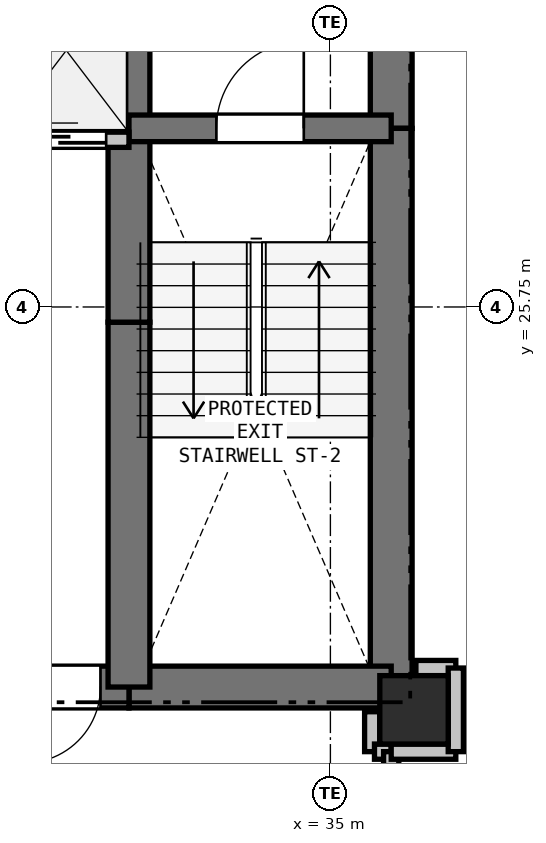
"""IFC4 building model, lengths in metres.
Left out: names, types, materials, properties, quantities, classifications, styles, units other than length and angle.
Written with IfcOpenShell. Run it as: python <this file> out.ifc"""

import sys

from ifc_helpers import new_model, si_unit, direction, frame, frame_2d, origin, origin_2d, place, context, subcontext, project, spatial, rectangle, extrude, element, fill, save


model = new_model("IFC4")
c1 = context("Model", 3, precision=1e-05, world=origin(), true_north=direction((0.0, 1.0)))
c2 = subcontext(c1, "Body", "Model", "MODEL_VIEW")
j1 = project(units=[si_unit("LENGTHUNIT", "METRE"), si_unit("PLANEANGLEUNIT", "RADIAN")], contexts=[c1])
p1 = place(None, origin())
s1 = spatial("IfcSite", under=j1, at=p1, CompositionType="ELEMENT")
p2 = place(p1, origin())
s2 = spatial("IfcBuilding", under=s1, at=p2, CompositionType="ELEMENT")
p3 = place(p2, frame((0.0, 0.0, 25.8)))
s3 = spatial("IfcBuildingStorey", under=s2, at=p3, CompositionType="ELEMENT", Elevation=25.8)
p4 = place(p3, frame((36.1, 20.45, 0.0), z_axis=(0.0, 0.0, 1.0), x_axis=(1.0, 0.0, 0.0)))
e1 = element("IfcColumn", 1, at=p4, inside=s3, PredefinedType="COLUMN", context=c2, shape_type="SweptSolid", body=[
    extrude(rectangle(XDim=0.9, YDim=0.9, at=origin_2d()), origin(), (0.0, 0.0, 1.0), 3.3),
])
p5 = place(p3, frame((35.8, 32.75, 0.0), z_axis=(0.0, 0.0, 1.0), x_axis=(0.0, -1.0, 0.0)))
e2 = element("IfcWall", 2, at=p5, inside=s3, PredefinedType="SHEAR", context=c2, shape_type="SweptSolid", body=[
    extrude(rectangle(XDim=4.65, YDim=0.55, at=frame_2d((2.325, 0.0))), origin(), (0.0, 0.0, 1.0), 3.04),
])
p6 = place(p3, frame((35.8, 28.1, 0.0), z_axis=(0.0, 0.0, 1.0), x_axis=(0.0, -1.0, 0.0)))
e3 = element("IfcWall", 3, at=p6, inside=s3, PredefinedType="SHEAR", context=c2, shape_type="SweptSolid", body=[
    extrude(rectangle(XDim=7.35, YDim=0.55, at=frame_2d((3.675, 0.0))), origin(), (0.0, 0.0, 1.0), 3.04),
])
p7 = place(p3, frame((35.8, 20.75, 0.0), z_axis=(0.0, 0.0, 1.0), x_axis=(-1.0, 0.0, 0.0)))
e4 = element("IfcWall", 4, at=p7, inside=s3, PredefinedType="SHEAR", context=c2, shape_type="SweptSolid", body=[
    extrude(rectangle(XDim=3.45, YDim=0.55, at=frame_2d((1.725, 0.0))), origin(), (0.0, 0.0, 1.0), 3.04),
])
p8 = place(p3, frame((32.35, 20.75, 0.0), z_axis=(0.0, 0.0, 1.0), x_axis=(-1.0, 0.0, 0.0)))
e5 = element("IfcWall", 5, at=p8, inside=s3, PredefinedType="SHEAR", context=c2, shape_type="SweptSolid", body=[
    extrude(rectangle(XDim=1.75, YDim=0.55, at=frame_2d((0.875, 0.0))), origin(), (0.0, 0.0, 1.0), 3.04),
])
p9 = place(p8, frame((0.375, 0.0, 0.0)))
e6 = element("IfcOpeningElement", 6, at=p9, cuts=e5, PredefinedType="OPENING", context=c2, shape_type="SweptSolid", body=[
    extrude(rectangle(XDim=1.0, YDim=2.15, at=frame_2d((0.5, 1.075))), frame((0.0, 0.285, 0.0), z_axis=(0.0, -1.0, 0.0), x_axis=(1.0, 0.0, 0.0)), (0.0, 0.0, 1.0), 0.57),
])
p10 = place(p3, frame((32.35, 20.75, 0.0), z_axis=(0.0, 0.0, 1.0), x_axis=(0.0, 1.0, 0.0)))
e7 = element("IfcWall", 7, at=p10, inside=s3, PredefinedType="SHEAR", context=c2, shape_type="SweptSolid", body=[
    extrude(rectangle(XDim=4.8, YDim=0.55, at=frame_2d((2.4, 0.0))), origin(), (0.0, 0.0, 1.0), 3.04),
])
p11 = place(p3, frame((32.35, 25.55, 0.0), z_axis=(0.0, 0.0, 1.0), x_axis=(0.0, 1.0, 0.0)))
e8 = element("IfcWall", 8, at=p11, inside=s3, PredefinedType="SHEAR", context=c2, shape_type="SweptSolid", body=[
    extrude(rectangle(XDim=2.4, YDim=0.55, at=frame_2d((1.2, 0.0))), origin(), (0.0, 0.0, 1.0), 3.04),
])
p12 = place(p3, frame((32.35, 27.95, 0.0), z_axis=(0.0, 0.0, 1.0), x_axis=(0.0, 1.0, 0.0)))
e9 = element("IfcWall", 9, at=p12, inside=s3, PredefinedType="SHEAR", context=c2, shape_type="SweptSolid", body=[
    extrude(rectangle(XDim=2.8, YDim=0.55, at=frame_2d((1.4, 0.0))), origin(), (0.0, 0.0, 1.0), 3.04),
])
p13 = place(p3, frame((32.35, 28.1, 0.0), z_axis=(0.0, 0.0, 1.0), x_axis=(1.0, 0.0, 0.0)))
e10 = element("IfcWall", 10, at=p13, inside=s3, PredefinedType="SHEAR", context=c2, shape_type="SweptSolid", body=[
    extrude(rectangle(XDim=3.45, YDim=0.35, at=frame_2d((1.725, 0.0))), origin(), (0.0, 0.0, 1.0), 3.04),
])
p14 = place(p13, frame((1.15, 0.0, 0.0)))
e11 = element("IfcOpeningElement", 11, at=p14, cuts=e10, PredefinedType="OPENING", context=c2, shape_type="SweptSolid", body=[
    extrude(rectangle(XDim=1.15, YDim=2.15, at=frame_2d((0.575, 1.075))), frame((0.0, 0.185, 0.0), z_axis=(0.0, -1.0, 0.0), x_axis=(1.0, 0.0, 0.0)), (0.0, 0.0, 1.0), 0.37),
])
p15 = place(p3, frame((27.4, 27.95, 0.0), z_axis=(0.0, 0.0, 1.0), x_axis=(1.0, 0.0, 0.0)))
e12 = element("IfcWall", 12, at=p15, inside=s3, PredefinedType="PARTITIONING", context=c2, shape_type="SweptSolid", body=[
    extrude(rectangle(XDim=4.95, YDim=0.2, at=frame_2d((2.475, 0.0))), origin(), (0.0, 0.0, 1.0), 3.04),
])
p16 = place(p15, frame((0.25, 0.0, 0.0)))
e13 = element("IfcOpeningElement", 13, at=p16, cuts=e12, PredefinedType="OPENING", context=c2, shape_type="SweptSolid", body=[
    extrude(rectangle(XDim=1.1, YDim=2.15, at=frame_2d((0.55, 1.075))), frame((0.0, 0.11, 0.0), z_axis=(0.0, -1.0, 0.0), x_axis=(1.0, 0.0, 0.0)), (0.0, 0.0, 1.0), 0.22),
])
p17 = place(p15, frame((1.9, 0.0, 0.0)))
e14 = element("IfcOpeningElement", 14, at=p17, cuts=e12, PredefinedType="OPENING", context=c2, shape_type="SweptSolid", body=[
    extrude(rectangle(XDim=1.1, YDim=2.15, at=frame_2d((0.55, 1.075))), frame((0.0, 0.11, 0.0), z_axis=(0.0, -1.0, 0.0), x_axis=(1.0, 0.0, 0.0)), (0.0, 0.0, 1.0), 0.22),
])
p18 = place(p15, frame((3.55, 0.0, 0.0)))
e15 = element("IfcOpeningElement", 15, at=p18, cuts=e12, PredefinedType="OPENING", context=c2, shape_type="SweptSolid", body=[
    extrude(rectangle(XDim=1.1, YDim=2.15, at=frame_2d((0.55, 1.075))), frame((0.0, 0.11, 0.0), z_axis=(0.0, -1.0, 0.0), x_axis=(1.0, 0.0, 0.0)), (0.0, 0.0, 1.0), 0.22),
])
p19 = place(p3, frame((35.55, 20.425, 0.0), z_axis=(0.0, 0.0, 1.0), x_axis=(0.0, -1.0, 0.0)))
e16 = element("IfcWall", 16, at=p19, inside=s3, PredefinedType="PARTITIONING", context=c2, shape_type="SweptSolid", body=[
    extrude(rectangle(XDim=0.525, YDim=0.2, at=frame_2d((0.263, 0.0))), origin(), (0.0, 0.0, 1.0), 2.488),
])
p20 = place(p3, frame((35.58, 19.9, 0.0), z_axis=(0.0, 0.0, 1.0), x_axis=(1.0, 0.0, 0.0)))
e17 = element("IfcWall", 17, at=p20, inside=s3, PredefinedType="PARTITIONING", context=c2, shape_type="SweptSolid", body=[
    extrude(rectangle(XDim=0.22, YDim=0.2, at=frame_2d((0.11, 0.0))), origin(), (0.0, 0.0, 1.0), 3.04),
])
p21 = place(p3, frame((35.8, 19.9, 0.0), z_axis=(0.0, 0.0, 1.0), x_axis=(0.0, -1.0, 0.0)))
e18 = element("IfcWall", 18, at=p21, inside=s3, PredefinedType="PARTITIONING", context=c2, shape_type="SweptSolid", body=[
    extrude(rectangle(XDim=1.75, YDim=0.2, at=frame_2d((0.875, 0.0))), origin(), (0.0, 0.0, 1.0), 3.04),
])
p22 = place(p21, frame((0.375, 0.0, 0.0)))
e19 = element("IfcOpeningElement", 19, at=p22, cuts=e18, PredefinedType="OPENING", context=c2, shape_type="SweptSolid", body=[
    extrude(rectangle(XDim=1.0, YDim=2.15, at=frame_2d((0.5, 1.075))), frame((0.0, 0.11, 0.0), z_axis=(0.0, -1.0, 0.0), x_axis=(1.0, 0.0, 0.0)), (0.0, 0.0, 1.0), 0.22),
])
p23 = place(p3, frame((36.65, 21.0, 0.0), z_axis=(0.0, 0.0, 1.0), x_axis=(-1.0, 0.0, 0.0)))
e20 = element("IfcWall", 20, at=p23, inside=s3, PredefinedType="PARTITIONING", context=c2, shape_type="SweptSolid", body=[
    extrude(rectangle(XDim=0.525, YDim=0.2, at=frame_2d((0.262, 0.0))), origin(), (0.0, 0.0, 1.0), 2.488),
])
p24 = place(p3, frame((35.8, 19.9, 0.0), z_axis=(0.0, 0.0, 1.0), x_axis=(1.0, 0.0, 0.0)))
e21 = element("IfcWall", 21, at=p24, inside=s3, PredefinedType="PARTITIONING", context=c2, shape_type="SweptSolid", body=[
    extrude(rectangle(XDim=0.85, YDim=0.2, at=frame_2d((0.425, 0.0))), origin(), (0.0, 0.0, 1.0), 2.337),
])
p25 = place(p3, frame((36.65, 19.9, 0.0), z_axis=(0.0, 0.0, 1.0), x_axis=(0.0, 1.0, 0.0)))
e22 = element("IfcWall", 22, at=p25, inside=s3, PredefinedType="PARTITIONING", context=c2, shape_type="SweptSolid", body=[
    extrude(rectangle(XDim=1.1, YDim=0.2, at=frame_2d((0.55, 0.0))), origin(), (0.0, 0.0, 1.0), 3.04),
])
p26 = place(p18, origin())
e23 = element("IfcDoor", 23, at=p26, inside=s3, OperationType="SLIDING_TO_LEFT", PredefinedType="DOOR", context=c2, shape_type="SweptSolid", body=[
    extrude(rectangle(XDim=1.1, YDim=2.15, at=frame_2d((0.55, 1.075))), frame((0.0, 0.025, 0.0), z_axis=(0.0, -1.0, 0.0), x_axis=(1.0, 0.0, 0.0)), (0.0, 0.0, 1.0), 0.05),
])
fill(e15, e23)
p27 = place(p9, origin())
e24 = element("IfcDoor", 24, at=p27, inside=s3, OperationType="SINGLE_SWING_RIGHT", PredefinedType="DOOR", context=c2, shape_type="SweptSolid", body=[
    extrude(rectangle(XDim=1.0, YDim=2.15, at=frame_2d((0.5, 1.075))), frame((0.0, 0.025, 0.0), z_axis=(0.0, -1.0, 0.0), x_axis=(1.0, 0.0, 0.0)), (0.0, 0.0, 1.0), 0.05),
])
fill(e6, e24)
p28 = place(p14, origin())
e25 = element("IfcDoor", 25, at=p28, inside=s3, OperationType="SINGLE_SWING_RIGHT", PredefinedType="DOOR", context=c2, shape_type="SweptSolid", body=[
    extrude(rectangle(XDim=1.15, YDim=2.15, at=frame_2d((0.575, 1.075))), frame((0.0, 0.025, 0.0), z_axis=(0.0, -1.0, 0.0), x_axis=(1.0, 0.0, 0.0)), (0.0, 0.0, 1.0), 0.05),
])
fill(e11, e25)
save(model, sys.argv[1])
